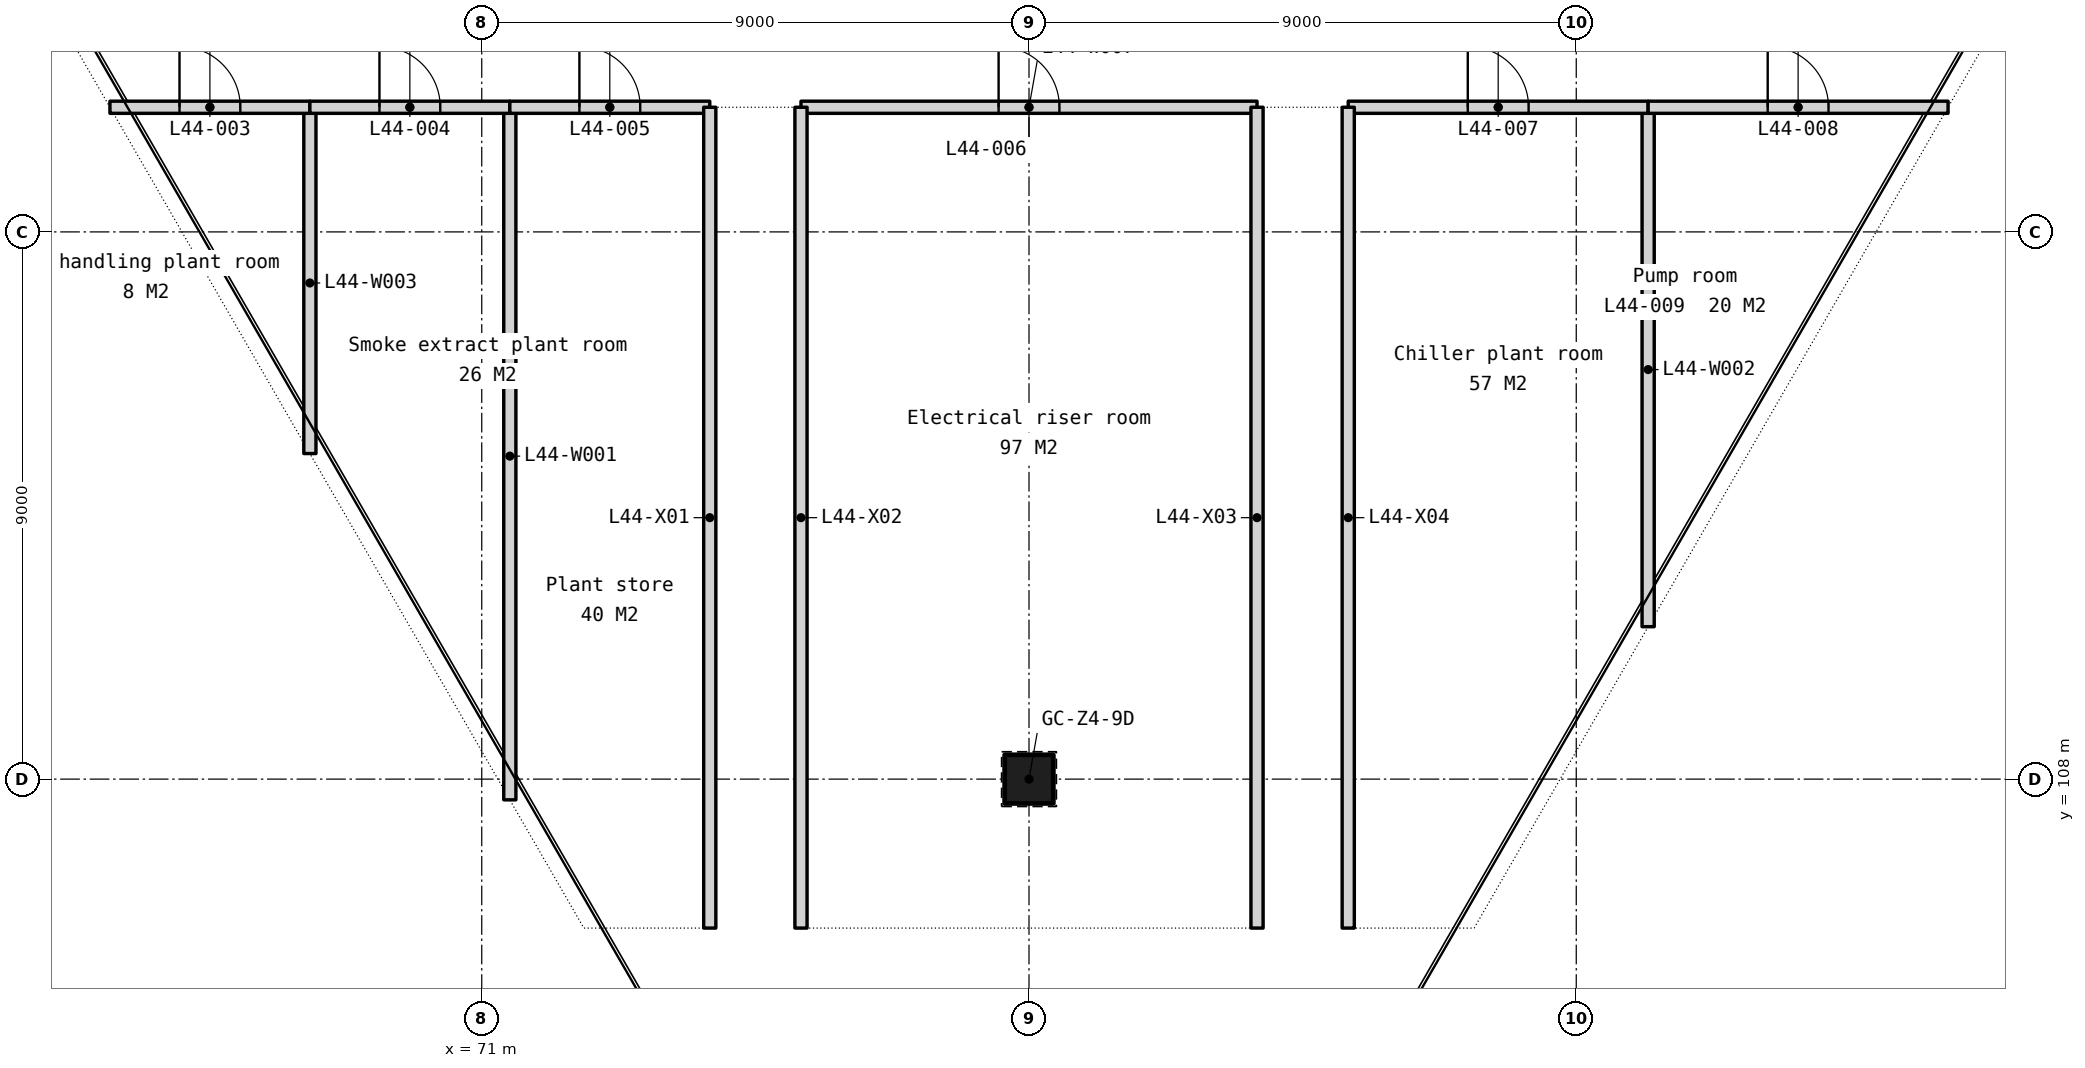
"""IFC4 building model, lengths in metres.
Left out: names, types, materials, properties, quantities, classifications, styles, units other than length and angle.
Written with IfcOpenShell. Run it as: python <this file> out.ifc"""

import sys

from ifc_helpers import new_model, si_unit, direction, frame, frame_2d, origin, origin_2d, place, context, subcontext, project, spatial, rectangle, extrude, element, fill, save


model = new_model("IFC4")
c1 = context("Model", 3, precision=1e-05, world=origin(), true_north=direction((0.0, 1.0)))
c2 = subcontext(c1, "Body", "Model", "MODEL_VIEW")
j1 = project(units=[si_unit("LENGTHUNIT", "METRE"), si_unit("PLANEANGLEUNIT", "RADIAN")], contexts=[c1])
p1 = place(None, origin())
s1 = spatial("IfcSite", under=j1, at=p1, CompositionType="ELEMENT")
p2 = place(p1, origin())
s2 = spatial("IfcBuilding", under=s1, at=p2, CompositionType="ELEMENT")
p3 = place(p2, frame((0.0, 0.0, 175.4)))
s3 = spatial("IfcBuildingStorey", under=s2, at=p3, CompositionType="ELEMENT", Elevation=175.4)
p4 = place(p3, frame((80.0, 108.0, 0.0), z_axis=(0.0, 0.0, 1.0), x_axis=(1.0, 0.0, 0.0)))
e1 = element("IfcColumn", 1, at=p4, inside=s3, PredefinedType="COLUMN", context=c2, shape_type="SweptSolid", body=[
    extrude(rectangle(XDim=0.8, YDim=0.8, at=origin_2d()), origin(), (0.0, 0.0, 1.0), 4.8),
])
p5 = place(p3, frame((71.462, 107.659, 0.0), z_axis=(0.0, 0.0, 1.0), x_axis=(0.0, 1.0, 0.0)))
e2 = element("IfcWall", 2, at=p5, inside=s3, PredefinedType="PARTITIONING", context=c2, shape_type="SweptSolid", body=[
    extrude(rectangle(XDim=11.306, YDim=0.2, at=frame_2d((5.653, 0.0))), origin(), (0.0, 0.0, 1.0), 4.35),
])
p6 = place(p3, frame((90.182, 110.507, 0.0), z_axis=(0.0, 0.0, 1.0), x_axis=(0.0, 1.0, 0.0)))
e3 = element("IfcWall", 3, at=p6, inside=s3, PredefinedType="PARTITIONING", context=c2, shape_type="SweptSolid", body=[
    extrude(rectangle(XDim=8.458, YDim=0.2, at=frame_2d((4.229, 0.0))), origin(), (0.0, 0.0, 1.0), 4.35),
])
p7 = place(p3, frame((68.174, 113.354, 0.0), z_axis=(0.0, 0.0, 1.0), x_axis=(0.0, 1.0, 0.0)))
e4 = element("IfcWall", 4, at=p7, inside=s3, PredefinedType="PARTITIONING", context=c2, shape_type="SweptSolid", body=[
    extrude(rectangle(XDim=5.611, YDim=0.2, at=frame_2d((2.805, 0.0))), origin(), (0.0, 0.0, 1.0), 4.35),
])
p8 = place(p3, frame((64.885, 119.05, 0.0), z_axis=(0.0, 0.0, 1.0), x_axis=(1.0, 0.0, 0.0)))
e5 = element("IfcWall", 5, at=p8, inside=s3, PredefinedType="PARTITIONING", context=c2, shape_type="SweptSolid", body=[
    extrude(rectangle(XDim=3.288, YDim=0.2, at=frame_2d((1.644, 0.0))), origin(), (0.0, 0.0, 1.0), 4.35),
])
p9 = place(p8, frame((1.144, 0.0, 0.0)))
e6 = element("IfcOpeningElement", 6, at=p9, cuts=e5, PredefinedType="OPENING", context=c2, shape_type="SweptSolid", body=[
    extrude(rectangle(XDim=1.0, YDim=2.1, at=frame_2d((0.5, 1.05))), frame((0.0, 0.11, 0.0), z_axis=(0.0, -1.0, 0.0), x_axis=(1.0, 0.0, 0.0)), (0.0, 0.0, 1.0), 0.22),
])
p10 = place(p3, frame((68.174, 119.05, 0.0), z_axis=(0.0, 0.0, 1.0), x_axis=(1.0, 0.0, 0.0)))
e7 = element("IfcWall", 7, at=p10, inside=s3, PredefinedType="PARTITIONING", context=c2, shape_type="SweptSolid", body=[
    extrude(rectangle(XDim=3.288, YDim=0.2, at=frame_2d((1.644, 0.0))), origin(), (0.0, 0.0, 1.0), 4.35),
])
p11 = place(p10, frame((1.144, 0.0, 0.0)))
e8 = element("IfcOpeningElement", 8, at=p11, cuts=e7, PredefinedType="OPENING", context=c2, shape_type="SweptSolid", body=[
    extrude(rectangle(XDim=1.0, YDim=2.1, at=frame_2d((0.5, 1.05))), frame((0.0, 0.11, 0.0), z_axis=(0.0, -1.0, 0.0), x_axis=(1.0, 0.0, 0.0)), (0.0, 0.0, 1.0), 0.22),
])
p12 = place(p3, frame((71.462, 119.05, 0.0), z_axis=(0.0, 0.0, 1.0), x_axis=(1.0, 0.0, 0.0)))
e9 = element("IfcWall", 9, at=p12, inside=s3, PredefinedType="PARTITIONING", context=c2, shape_type="SweptSolid", body=[
    extrude(rectangle(XDim=3.288, YDim=0.2, at=frame_2d((1.644, 0.0))), origin(), (0.0, 0.0, 1.0), 4.35),
])
p13 = place(p12, frame((1.144, 0.0, 0.0)))
e10 = element("IfcOpeningElement", 10, at=p13, cuts=e9, PredefinedType="OPENING", context=c2, shape_type="SweptSolid", body=[
    extrude(rectangle(XDim=1.0, YDim=2.1, at=frame_2d((0.5, 1.05))), frame((0.0, 0.11, 0.0), z_axis=(0.0, -1.0, 0.0), x_axis=(1.0, 0.0, 0.0)), (0.0, 0.0, 1.0), 0.22),
])
p14 = place(p3, frame((76.25, 119.05, 0.0), z_axis=(0.0, 0.0, 1.0), x_axis=(1.0, 0.0, 0.0)))
e11 = element("IfcWall", 11, at=p14, inside=s3, PredefinedType="PARTITIONING", context=c2, shape_type="SweptSolid", body=[
    extrude(rectangle(XDim=7.5, YDim=0.2, at=frame_2d((3.75, 0.0))), origin(), (0.0, 0.0, 1.0), 4.35),
])
p15 = place(p14, frame((3.25, 0.0, 0.0)))
e12 = element("IfcOpeningElement", 12, at=p15, cuts=e11, PredefinedType="OPENING", context=c2, shape_type="SweptSolid", body=[
    extrude(rectangle(XDim=1.0, YDim=2.1, at=frame_2d((0.5, 1.05))), frame((0.0, 0.11, 0.0), z_axis=(0.0, -1.0, 0.0), x_axis=(1.0, 0.0, 0.0)), (0.0, 0.0, 1.0), 0.22),
])
p16 = place(p3, frame((85.25, 119.05, 0.0), z_axis=(0.0, 0.0, 1.0), x_axis=(1.0, 0.0, 0.0)))
e13 = element("IfcWall", 13, at=p16, inside=s3, PredefinedType="PARTITIONING", context=c2, shape_type="SweptSolid", body=[
    extrude(rectangle(XDim=4.932, YDim=0.2, at=frame_2d((2.466, 0.0))), origin(), (0.0, 0.0, 1.0), 4.35),
])
p17 = place(p16, frame((1.966, 0.0, 0.0)))
e14 = element("IfcOpeningElement", 14, at=p17, cuts=e13, PredefinedType="OPENING", context=c2, shape_type="SweptSolid", body=[
    extrude(rectangle(XDim=1.0, YDim=2.1, at=frame_2d((0.5, 1.05))), frame((0.0, 0.11, 0.0), z_axis=(0.0, -1.0, 0.0), x_axis=(1.0, 0.0, 0.0)), (0.0, 0.0, 1.0), 0.22),
])
p18 = place(p3, frame((90.182, 119.05, 0.0), z_axis=(0.0, 0.0, 1.0), x_axis=(1.0, 0.0, 0.0)))
e15 = element("IfcWall", 15, at=p18, inside=s3, PredefinedType="PARTITIONING", context=c2, shape_type="SweptSolid", body=[
    extrude(rectangle(XDim=4.932, YDim=0.2, at=frame_2d((2.466, 0.0))), origin(), (0.0, 0.0, 1.0), 4.35),
])
p19 = place(p18, frame((1.966, 0.0, 0.0)))
e16 = element("IfcOpeningElement", 16, at=p19, cuts=e15, PredefinedType="OPENING", context=c2, shape_type="SweptSolid", body=[
    extrude(rectangle(XDim=1.0, YDim=2.1, at=frame_2d((0.5, 1.05))), frame((0.0, 0.11, 0.0), z_axis=(0.0, -1.0, 0.0), x_axis=(1.0, 0.0, 0.0)), (0.0, 0.0, 1.0), 0.22),
])
for number, where, z_axis, x_axis in (
    (17, (74.75, 105.55, 0.0), (0.0, 0.0, 1.0), (0.0, 1.0, 0.0)),
    (18, (76.25, 105.55, 0.0), (0.0, 0.0, 1.0), (0.0, 1.0, 0.0)),
    (19, (83.75, 105.55, 0.0), (0.0, 0.0, 1.0), (0.0, 1.0, 0.0)),
    (20, (85.25, 105.55, 0.0), (0.0, 0.0, 1.0), (0.0, 1.0, 0.0)),
):
    element("IfcWall", number, at=place(p3, frame(where, z_axis=z_axis, x_axis=x_axis)), inside=s3, PredefinedType="PARTITIONING", context=c2, shape_type="SweptSolid", body=[
        extrude(rectangle(XDim=13.5, YDim=0.2, at=frame_2d((6.75, 0.0))), origin(), (0.0, 0.0, 1.0), 4.35),
    ])
p20 = place(p9, origin())
e21 = element("IfcDoor", 21, at=p20, inside=s3, OperationType="SINGLE_SWING_LEFT", PredefinedType="DOOR", context=c2, shape_type="SweptSolid", body=[
    extrude(rectangle(XDim=1.0, YDim=2.1, at=frame_2d((0.5, 1.05))), frame((0.0, 0.025, 0.0), z_axis=(0.0, -1.0, 0.0), x_axis=(1.0, 0.0, 0.0)), (0.0, 0.0, 1.0), 0.05),
])
fill(e6, e21)
p21 = place(p11, origin())
e22 = element("IfcDoor", 22, at=p21, inside=s3, OperationType="SINGLE_SWING_LEFT", PredefinedType="DOOR", context=c2, shape_type="SweptSolid", body=[
    extrude(rectangle(XDim=1.0, YDim=2.1, at=frame_2d((0.5, 1.05))), frame((0.0, 0.025, 0.0), z_axis=(0.0, -1.0, 0.0), x_axis=(1.0, 0.0, 0.0)), (0.0, 0.0, 1.0), 0.05),
])
fill(e8, e22)
p22 = place(p13, origin())
e23 = element("IfcDoor", 23, at=p22, inside=s3, OperationType="SINGLE_SWING_LEFT", PredefinedType="DOOR", context=c2, shape_type="SweptSolid", body=[
    extrude(rectangle(XDim=1.0, YDim=2.1, at=frame_2d((0.5, 1.05))), frame((0.0, 0.025, 0.0), z_axis=(0.0, -1.0, 0.0), x_axis=(1.0, 0.0, 0.0)), (0.0, 0.0, 1.0), 0.05),
])
fill(e10, e23)
p23 = place(p15, origin())
e24 = element("IfcDoor", 24, at=p23, inside=s3, OperationType="SINGLE_SWING_LEFT", PredefinedType="DOOR", context=c2, shape_type="SweptSolid", body=[
    extrude(rectangle(XDim=1.0, YDim=2.1, at=frame_2d((0.5, 1.05))), frame((0.0, 0.025, 0.0), z_axis=(0.0, -1.0, 0.0), x_axis=(1.0, 0.0, 0.0)), (0.0, 0.0, 1.0), 0.05),
])
fill(e12, e24)
p24 = place(p17, origin())
e25 = element("IfcDoor", 25, at=p24, inside=s3, OperationType="SINGLE_SWING_LEFT", PredefinedType="DOOR", context=c2, shape_type="SweptSolid", body=[
    extrude(rectangle(XDim=1.0, YDim=2.1, at=frame_2d((0.5, 1.05))), frame((0.0, 0.025, 0.0), z_axis=(0.0, -1.0, 0.0), x_axis=(1.0, 0.0, 0.0)), (0.0, 0.0, 1.0), 0.05),
])
fill(e14, e25)
p25 = place(p19, origin())
e26 = element("IfcDoor", 26, at=p25, inside=s3, OperationType="SINGLE_SWING_LEFT", PredefinedType="DOOR", context=c2, shape_type="SweptSolid", body=[
    extrude(rectangle(XDim=1.0, YDim=2.1, at=frame_2d((0.5, 1.05))), frame((0.0, 0.025, 0.0), z_axis=(0.0, -1.0, 0.0), x_axis=(1.0, 0.0, 0.0)), (0.0, 0.0, 1.0), 0.05),
])
fill(e16, e26)
save(model, sys.argv[1])
